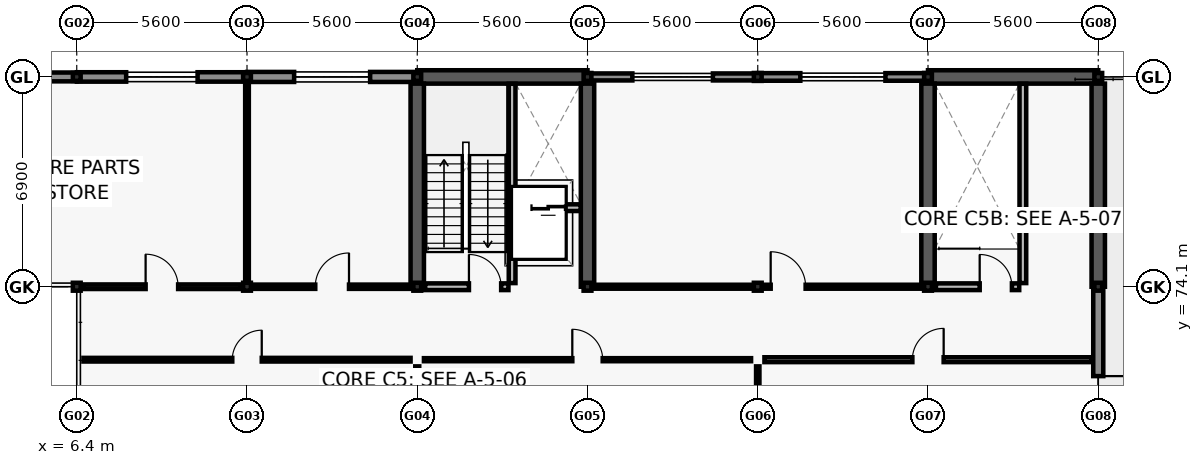
"""IFC4 building model, lengths in metres.
Left out: names, types, materials, properties, quantities, classifications, styles, units other than length and angle.
Written with IfcOpenShell. Run it as: python <this file> out.ifc"""

import sys

from ifc_helpers import new_model, si_unit, direction, frame, frame_2d, origin, origin_2d, place, context, subcontext, project, spatial, rectangle, i_section, extrude, element, fill, save


model = new_model("IFC4")
c1 = context("Model", 3, precision=1e-05, world=origin(), true_north=direction((0.0, 1.0)))
c2 = subcontext(c1, "Body", "Model", "MODEL_VIEW")
j1 = project(units=[si_unit("LENGTHUNIT", "METRE"), si_unit("PLANEANGLEUNIT", "RADIAN")], contexts=[c1])
p1 = place(None, origin())
s1 = spatial("IfcSite", under=j1, at=p1, CompositionType="ELEMENT")
p2 = place(p1, origin())
s2 = spatial("IfcBuilding", under=s1, at=p2, CompositionType="ELEMENT")
p3 = place(p2, frame((0.0, 0.0, 5.4)))
s3 = spatial("IfcBuildingStorey", under=s2, at=p3, CompositionType="ELEMENT", Elevation=5.4)
for number, where, z_axis, x_axis in (
    (1, (6.4, 74.1, 0.0), (0.0, 0.0, 1.0), (1.0, 0.0, 0.0)),
    (2, (6.4, 81.0, 0.0), (0.0, 0.0, 1.0), (1.0, 0.0, 0.0)),
    (3, (12.0, 74.1, 0.0), (0.0, 0.0, 1.0), (1.0, 0.0, 0.0)),
    (4, (12.0, 81.0, 0.0), (0.0, 0.0, 1.0), (1.0, 0.0, 0.0)),
    (5, (17.6, 74.1, 0.0), (0.0, 0.0, 1.0), (1.0, 0.0, 0.0)),
    (6, (17.6, 81.0, 0.0), (0.0, 0.0, 1.0), (1.0, 0.0, 0.0)),
    (7, (23.2, 74.1, 0.0), (0.0, 0.0, 1.0), (1.0, 0.0, 0.0)),
    (8, (23.2, 81.0, 0.0), (0.0, 0.0, 1.0), (1.0, 0.0, 0.0)),
    (9, (28.8, 74.1, 0.0), (0.0, 0.0, 1.0), (1.0, 0.0, 0.0)),
    (10, (28.8, 81.0, 0.0), (0.0, 0.0, 1.0), (1.0, 0.0, 0.0)),
    (11, (34.4, 74.1, 0.0), (0.0, 0.0, 1.0), (1.0, 0.0, 0.0)),
    (12, (34.4, 81.0, 0.0), (0.0, 0.0, 1.0), (1.0, 0.0, 0.0)),
    (13, (40.0, 74.1, 0.0), (0.0, 0.0, 1.0), (1.0, 0.0, 0.0)),
    (14, (40.0, 81.0, 0.0), (0.0, 0.0, 1.0), (1.0, 0.0, 0.0)),
):
    element("IfcColumn", number, at=place(p3, frame(where, z_axis=z_axis, x_axis=x_axis)), inside=s3, PredefinedType="COLUMN", context=c2, shape_type="SweptSolid", body=[
        extrude(i_section(OverallWidth=0.256, OverallDepth=0.26, WebThickness=0.01, FlangeThickness=0.017, FilletRadius=0.013, at=origin_2d()), origin(), (0.0, 0.0, 1.0), 4.2),
    ])
p4 = place(p3, frame((17.6, 81.0, 0.0), z_axis=(0.0, 0.0, 1.0), x_axis=(1.0, 0.0, 0.0)))
e15 = element("IfcWall", 15, at=p4, inside=s3, PredefinedType="SHEAR", context=c2, shape_type="SweptSolid", body=[
    extrude(rectangle(XDim=5.6, YDim=0.44, at=frame_2d((2.8, 0.0))), origin(), (0.0, 0.0, 1.0), 3.96),
])
for number, where, z_axis, x_axis in (
    (16, (17.6, 74.1, 0.0), (0.0, 0.0, 1.0), (0.0, 1.0, 0.0)),
    (17, (23.2, 74.1, 0.0), (0.0, 0.0, 1.0), (0.0, 1.0, 0.0)),
):
    element("IfcWall", number, at=place(p3, frame(where, z_axis=z_axis, x_axis=x_axis)), inside=s3, PredefinedType="SHEAR", context=c2, shape_type="SweptSolid", body=[
        extrude(rectangle(XDim=6.68, YDim=0.44, at=frame_2d((3.34, 0.0))), origin(), (0.0, 0.0, 1.0), 3.96),
    ])
p5 = place(p3, frame((34.4, 81.0, 0.0), z_axis=(0.0, 0.0, 1.0), x_axis=(1.0, 0.0, 0.0)))
e18 = element("IfcWall", 18, at=p5, inside=s3, PredefinedType="SHEAR", context=c2, shape_type="SweptSolid", body=[
    extrude(rectangle(XDim=5.6, YDim=0.44, at=frame_2d((2.8, 0.0))), origin(), (0.0, 0.0, 1.0), 3.96),
])
for number, where, z_axis, x_axis in (
    (19, (34.4, 74.1, 0.0), (0.0, 0.0, 1.0), (0.0, 1.0, 0.0)),
    (20, (40.0, 74.1, 0.0), (0.0, 0.0, 1.0), (0.0, 1.0, 0.0)),
):
    element("IfcWall", number, at=place(p3, frame(where, z_axis=z_axis, x_axis=x_axis)), inside=s3, PredefinedType="SHEAR", context=c2, shape_type="SweptSolid", body=[
        extrude(rectangle(XDim=6.68, YDim=0.44, at=frame_2d((3.34, 0.0))), origin(), (0.0, 0.0, 1.0), 3.96),
    ])
p6 = place(p3, frame((0.805, 81.0, 0.0), z_axis=(0.0, 0.0, 1.0), x_axis=(1.0, 0.0, 0.0)))
e21 = element("IfcWall", 21, at=p6, inside=s3, PredefinedType="SOLIDWALL", context=c2, shape_type="SweptSolid", body=[
    extrude(rectangle(XDim=5.59, YDim=0.29, at=frame_2d((2.795, 0.0))), origin(), (0.0, 0.0, 1.0), 3.32),
])
p7 = place(p6, frame((1.695, 0.0, 0.8)))
e22 = element("IfcOpeningElement", 22, at=p7, cuts=e21, PredefinedType="OPENING", context=c2, shape_type="SweptSolid", body=[
    extrude(rectangle(XDim=2.2, YDim=1.8, at=frame_2d((1.1, 0.9))), frame((0.0, 0.155, 0.0), z_axis=(0.0, -1.0, 0.0), x_axis=(1.0, 0.0, 0.0)), (0.0, 0.0, 1.0), 0.31),
])
p8 = place(p3, frame((6.405, 81.0, 0.0), z_axis=(0.0, 0.0, 1.0), x_axis=(1.0, 0.0, 0.0)))
e23 = element("IfcWall", 23, at=p8, inside=s3, PredefinedType="SOLIDWALL", context=c2, shape_type="SweptSolid", body=[
    extrude(rectangle(XDim=5.59, YDim=0.31, at=frame_2d((2.795, 0.0))), origin(), (0.0, 0.0, 1.0), 3.32),
])
p9 = place(p8, frame((1.62, 0.0, 0.8)))
e24 = element("IfcOpeningElement", 24, at=p9, cuts=e23, PredefinedType="OPENING", context=c2, shape_type="SweptSolid", body=[
    extrude(rectangle(XDim=2.35, YDim=1.8, at=frame_2d((1.175, 0.9))), frame((0.0, 0.165, 0.0), z_axis=(0.0, -1.0, 0.0), x_axis=(1.0, 0.0, 0.0)), (0.0, 0.0, 1.0), 0.33),
])
p10 = place(p3, frame((12.005, 81.0, 0.0), z_axis=(0.0, 0.0, 1.0), x_axis=(1.0, 0.0, 0.0)))
e25 = element("IfcWall", 25, at=p10, inside=s3, PredefinedType="SOLIDWALL", context=c2, shape_type="SweptSolid", body=[
    extrude(rectangle(XDim=5.59, YDim=0.33, at=frame_2d((2.795, 0.0))), origin(), (0.0, 0.0, 1.0), 3.32),
])
p11 = place(p10, frame((1.545, 0.0, 0.8)))
e26 = element("IfcOpeningElement", 26, at=p11, cuts=e25, PredefinedType="OPENING", context=c2, shape_type="SweptSolid", body=[
    extrude(rectangle(XDim=2.5, YDim=1.8, at=frame_2d((1.25, 0.9))), frame((0.0, 0.175, 0.0), z_axis=(0.0, -1.0, 0.0), x_axis=(1.0, 0.0, 0.0)), (0.0, 0.0, 1.0), 0.35),
])
p12 = place(p3, frame((23.205, 81.0, 0.0), z_axis=(0.0, 0.0, 1.0), x_axis=(1.0, 0.0, 0.0)))
e27 = element("IfcWall", 27, at=p12, inside=s3, PredefinedType="SOLIDWALL", context=c2, shape_type="SweptSolid", body=[
    extrude(rectangle(XDim=5.59, YDim=0.23, at=frame_2d((2.795, 0.0))), origin(), (0.0, 0.0, 1.0), 3.32),
])
p13 = place(p12, frame((1.47, 0.0, 0.8)))
e28 = element("IfcOpeningElement", 28, at=p13, cuts=e27, PredefinedType="OPENING", context=c2, shape_type="SweptSolid", body=[
    extrude(rectangle(XDim=2.65, YDim=1.8, at=frame_2d((1.325, 0.9))), frame((0.0, 0.125, 0.0), z_axis=(0.0, -1.0, 0.0), x_axis=(1.0, 0.0, 0.0)), (0.0, 0.0, 1.0), 0.25),
])
p14 = place(p3, frame((28.805, 81.0, 0.0), z_axis=(0.0, 0.0, 1.0), x_axis=(1.0, 0.0, 0.0)))
e29 = element("IfcWall", 29, at=p14, inside=s3, PredefinedType="SOLIDWALL", context=c2, shape_type="SweptSolid", body=[
    extrude(rectangle(XDim=5.59, YDim=0.25, at=frame_2d((2.795, 0.0))), origin(), (0.0, 0.0, 1.0), 3.32),
])
p15 = place(p14, frame((1.395, 0.0, 0.8)))
e30 = element("IfcOpeningElement", 30, at=p15, cuts=e29, PredefinedType="OPENING", context=c2, shape_type="SweptSolid", body=[
    extrude(rectangle(XDim=2.8, YDim=1.8, at=frame_2d((1.4, 0.9))), frame((0.0, 0.135, 0.0), z_axis=(0.0, -1.0, 0.0), x_axis=(1.0, 0.0, 0.0)), (0.0, 0.0, 1.0), 0.27),
])
p16 = place(p3, frame((40.0, 74.095, 0.0), z_axis=(0.0, 0.0, 1.0), x_axis=(0.0, -1.0, 0.0)))
e31 = element("IfcWall", 31, at=p16, inside=s3, PredefinedType="SOLIDWALL", context=c2, shape_type="SweptSolid", body=[
    extrude(rectangle(XDim=6.89, YDim=0.33, at=frame_2d((3.445, 0.0))), origin(), (0.0, 0.0, 1.0), 3.32),
])
p17 = place(p16, frame((2.935, 0.0, 0.0)))
e32 = element("IfcOpeningElement", 32, at=p17, cuts=e31, PredefinedType="OPENING", context=c2, shape_type="SweptSolid", body=[
    extrude(rectangle(XDim=1.02, YDim=2.14, at=frame_2d((0.51, 1.07))), frame((0.0, 0.175, 0.0), z_axis=(0.0, -1.0, 0.0), x_axis=(1.0, 0.0, 0.0)), (0.0, 0.0, 1.0), 0.35),
])
p18 = place(p3, frame((20.72, 74.22, 0.0), z_axis=(0.0, 0.0, 1.0), x_axis=(0.0, 1.0, 0.0)))
e33 = element("IfcWall", 33, at=p18, inside=s3, PredefinedType="SOLIDWALL", context=c2, shape_type="SweptSolid", body=[
    extrude(rectangle(XDim=6.555, YDim=0.22, at=frame_2d((3.277, 0.0))), origin(), (0.0, 0.0, 1.0), 3.96),
])
p19 = place(p3, frame((17.86, 74.1, 0.0), z_axis=(0.0, 0.0, 1.0), x_axis=(1.0, 0.0, 0.0)))
e34 = element("IfcWall", 34, at=p19, inside=s3, PredefinedType="SOLIDWALL", context=c2, shape_type="SweptSolid", body=[
    extrude(rectangle(XDim=2.74, YDim=0.22, at=frame_2d((1.37, 0.0))), origin(), (0.0, 0.0, 1.0), 3.32),
])
p20 = place(p19, frame((1.44, 0.0, 0.0)))
e35 = element("IfcOpeningElement", 35, at=p20, cuts=e34, PredefinedType="OPENING", context=c2, shape_type="SweptSolid", body=[
    extrude(rectangle(XDim=1.06, YDim=2.1, at=frame_2d((0.53, 1.05))), frame((0.0, 0.12, 0.0), z_axis=(0.0, -1.0, 0.0), x_axis=(1.0, 0.0, 0.0)), (0.0, 0.0, 1.0), 0.24),
])
p21 = place(p3, frame((20.84, 76.7, 0.0), z_axis=(0.0, 0.0, 1.0), x_axis=(1.0, 0.0, 0.0)))
e36 = element("IfcWall", 36, at=p21, inside=s3, PredefinedType="SOLIDWALL", context=c2, shape_type="SweptSolid", body=[
    extrude(rectangle(XDim=2.135, YDim=0.22, at=frame_2d((1.067, 0.0))), origin(), (0.0, 0.0, 1.0), 3.96),
])
p22 = place(p21, frame((0.518, 0.0, 0.0)))
e37 = element("IfcOpeningElement", 37, at=p22, cuts=e36, PredefinedType="OPENING", context=c2, shape_type="SweptSolid", body=[
    extrude(rectangle(XDim=1.1, YDim=2.1, at=frame_2d((0.55, 1.05))), frame((0.0, 0.12, 0.0), z_axis=(0.0, -1.0, 0.0), x_axis=(1.0, 0.0, 0.0)), (0.0, 0.0, 1.0), 0.24),
])
p23 = place(p3, frame((37.52, 74.22, 0.0), z_axis=(0.0, 0.0, 1.0), x_axis=(0.0, 1.0, 0.0)))
e38 = element("IfcWall", 38, at=p23, inside=s3, PredefinedType="SOLIDWALL", context=c2, shape_type="SweptSolid", body=[
    extrude(rectangle(XDim=6.555, YDim=0.22, at=frame_2d((3.277, 0.0))), origin(), (0.0, 0.0, 1.0), 3.96),
])
p24 = place(p3, frame((34.66, 74.1, 0.0), z_axis=(0.0, 0.0, 1.0), x_axis=(1.0, 0.0, 0.0)))
e39 = element("IfcWall", 39, at=p24, inside=s3, PredefinedType="SOLIDWALL", context=c2, shape_type="SweptSolid", body=[
    extrude(rectangle(XDim=2.74, YDim=0.22, at=frame_2d((1.37, 0.0))), origin(), (0.0, 0.0, 1.0), 3.32),
])
p25 = place(p24, frame((1.44, 0.0, 0.0)))
e40 = element("IfcOpeningElement", 40, at=p25, cuts=e39, PredefinedType="OPENING", context=c2, shape_type="SweptSolid", body=[
    extrude(rectangle(XDim=1.06, YDim=2.1, at=frame_2d((0.53, 1.05))), frame((0.0, 0.12, 0.0), z_axis=(0.0, -1.0, 0.0), x_axis=(1.0, 0.0, 0.0)), (0.0, 0.0, 1.0), 0.24),
])
p26 = place(p3, frame((17.6, 60.52, 0.0), z_axis=(0.0, 0.0, 1.0), x_axis=(0.0, 1.0, 0.0)))
e41 = element("IfcWall", 41, at=p26, inside=s3, PredefinedType="PARTITIONING", context=c2, shape_type="SweptSolid", body=[
    extrude(rectangle(XDim=10.96, YDim=0.13, at=frame_2d((5.48, 0.0))), origin(), (0.0, 0.0, 1.0), 3.3),
])
p27 = place(p3, frame((6.62, 71.7, 0.0), z_axis=(0.0, 0.0, 1.0), x_axis=(1.0, 0.0, 0.0)))
e42 = element("IfcWall", 42, at=p27, inside=s3, PredefinedType="PARTITIONING", context=c2, shape_type="SweptSolid", body=[
    extrude(rectangle(XDim=10.76, YDim=0.12, at=frame_2d((5.38, 0.0))), origin(), (0.0, 0.0, 1.0), 3.3),
])
p28 = place(p27, frame((4.895, 0.0, 0.0)))
e43 = element("IfcOpeningElement", 43, at=p28, cuts=e42, PredefinedType="OPENING", context=c2, shape_type="SweptSolid", body=[
    extrude(rectangle(XDim=0.97, YDim=2.1, at=frame_2d((0.485, 1.05))), frame((0.0, 0.07, 0.0), z_axis=(0.0, -1.0, 0.0), x_axis=(1.0, 0.0, 0.0)), (0.0, 0.0, 1.0), 0.14),
])
p29 = place(p3, frame((28.8, 60.52, 0.0), z_axis=(0.0, 0.0, 1.0), x_axis=(0.0, 1.0, 0.0)))
e44 = element("IfcWall", 44, at=p29, inside=s3, PredefinedType="PARTITIONING", context=c2, shape_type="SweptSolid", body=[
    extrude(rectangle(XDim=10.96, YDim=0.11, at=frame_2d((5.48, 0.0))), origin(), (0.0, 0.0, 1.0), 3.3),
])
p30 = place(p3, frame((17.82, 71.7, 0.0), z_axis=(0.0, 0.0, 1.0), x_axis=(1.0, 0.0, 0.0)))
e45 = element("IfcWall", 45, at=p30, inside=s3, PredefinedType="PARTITIONING", context=c2, shape_type="SweptSolid", body=[
    extrude(rectangle(XDim=10.76, YDim=0.1, at=frame_2d((5.38, 0.0))), origin(), (0.0, 0.0, 1.0), 3.3),
])
p31 = place(p30, frame((4.88, 0.0, 0.0)))
e46 = element("IfcOpeningElement", 46, at=p31, cuts=e45, PredefinedType="OPENING", context=c2, shape_type="SweptSolid", body=[
    extrude(rectangle(XDim=1.0, YDim=2.12, at=frame_2d((0.5, 1.06))), frame((0.0, 0.06, 0.0), z_axis=(0.0, -1.0, 0.0), x_axis=(1.0, 0.0, 0.0)), (0.0, 0.0, 1.0), 0.12),
])
p32 = place(p3, frame((29.02, 71.7, 0.0), z_axis=(0.0, 0.0, 1.0), x_axis=(1.0, 0.0, 0.0)))
e47 = element("IfcWall", 47, at=p32, inside=s3, PredefinedType="PARTITIONING", context=c2, shape_type="SweptSolid", body=[
    extrude(rectangle(XDim=10.76, YDim=0.16, at=frame_2d((5.38, 0.0))), origin(), (0.0, 0.0, 1.0), 3.3),
])
p33 = place(p32, frame((4.865, 0.0, 0.0)))
e48 = element("IfcOpeningElement", 48, at=p33, cuts=e47, PredefinedType="OPENING", context=c2, shape_type="SweptSolid", body=[
    extrude(rectangle(XDim=1.03, YDim=2.06, at=frame_2d((0.515, 1.03))), frame((0.0, 0.09, 0.0), z_axis=(0.0, -1.0, 0.0), x_axis=(1.0, 0.0, 0.0)), (0.0, 0.0, 1.0), 0.18),
])
p34 = place(p3, frame((6.62, 74.1, 0.0), z_axis=(0.0, 0.0, 1.0), x_axis=(1.0, 0.0, 0.0)))
e49 = element("IfcWall", 49, at=p34, inside=s3, PredefinedType="PARTITIONING", context=c2, shape_type="SweptSolid", body=[
    extrude(rectangle(XDim=5.16, YDim=0.15, at=frame_2d((2.58, 0.0))), origin(), (0.0, 0.0, 1.0), 3.3),
])
p35 = place(p34, frame((2.045, 0.0, 0.0)))
e50 = element("IfcOpeningElement", 50, at=p35, cuts=e49, PredefinedType="OPENING", context=c2, shape_type="SweptSolid", body=[
    extrude(rectangle(XDim=1.07, YDim=2.08, at=frame_2d((0.535, 1.04))), frame((0.0, 0.085, 0.0), z_axis=(0.0, -1.0, 0.0), x_axis=(1.0, 0.0, 0.0)), (0.0, 0.0, 1.0), 0.17),
])
p36 = place(p3, frame((12.22, 74.1, 0.0), z_axis=(0.0, 0.0, 1.0), x_axis=(1.0, 0.0, 0.0)))
e51 = element("IfcWall", 51, at=p36, inside=s3, PredefinedType="PARTITIONING", context=c2, shape_type="SweptSolid", body=[
    extrude(rectangle(XDim=5.16, YDim=0.14, at=frame_2d((2.58, 0.0))), origin(), (0.0, 0.0, 1.0), 3.3),
])
p37 = place(p36, frame((2.025, 0.0, 0.0)))
e52 = element("IfcOpeningElement", 52, at=p37, cuts=e51, PredefinedType="OPENING", context=c2, shape_type="SweptSolid", body=[
    extrude(rectangle(XDim=1.11, YDim=2.1, at=frame_2d((0.555, 1.05))), frame((0.0, 0.08, 0.0), z_axis=(0.0, -1.0, 0.0), x_axis=(1.0, 0.0, 0.0)), (0.0, 0.0, 1.0), 0.16),
])
p38 = place(p3, frame((23.42, 74.1, 0.0), z_axis=(0.0, 0.0, 1.0), x_axis=(1.0, 0.0, 0.0)))
e53 = element("IfcWall", 53, at=p38, inside=s3, PredefinedType="PARTITIONING", context=c2, shape_type="SweptSolid", body=[
    extrude(rectangle(XDim=10.76, YDim=0.13, at=frame_2d((5.38, 0.0))), origin(), (0.0, 0.0, 1.0), 3.3),
])
p39 = place(p38, frame((5.805, 0.0, 0.0)))
e54 = element("IfcOpeningElement", 54, at=p39, cuts=e53, PredefinedType="OPENING", context=c2, shape_type="SweptSolid", body=[
    extrude(rectangle(XDim=1.15, YDim=2.12, at=frame_2d((0.575, 1.06))), frame((0.0, 0.075, 0.0), z_axis=(0.0, -1.0, 0.0), x_axis=(1.0, 0.0, 0.0)), (0.0, 0.0, 1.0), 0.15),
])
p40 = place(p3, frame((12.0, 74.32, 0.0), z_axis=(0.0, 0.0, 1.0), x_axis=(0.0, 1.0, 0.0)))
e55 = element("IfcWall", 55, at=p40, inside=s3, PredefinedType="PARTITIONING", context=c2, shape_type="SweptSolid", body=[
    extrude(rectangle(XDim=6.46, YDim=0.12, at=frame_2d((3.23, 0.0))), origin(), (0.0, 0.0, 1.0), 3.3),
])
p41 = place(p9, origin())
e56 = element("IfcWindow", 56, at=p41, inside=s3, PartitioningType="DOUBLE_PANEL_VERTICAL", PredefinedType="WINDOW", context=c2, shape_type="SweptSolid", body=[
    extrude(rectangle(XDim=2.35, YDim=1.8, at=frame_2d((1.175, 0.9))), frame((0.0, 0.03, 0.0), z_axis=(0.0, -1.0, 0.0), x_axis=(1.0, 0.0, 0.0)), (0.0, 0.0, 1.0), 0.06),
])
fill(e24, e56)
p42 = place(p11, origin())
e57 = element("IfcWindow", 57, at=p42, inside=s3, PartitioningType="TRIPLE_PANEL_VERTICAL", PredefinedType="WINDOW", context=c2, shape_type="SweptSolid", body=[
    extrude(rectangle(XDim=2.5, YDim=1.8, at=frame_2d((1.25, 0.9))), frame((0.0, 0.03, 0.0), z_axis=(0.0, -1.0, 0.0), x_axis=(1.0, 0.0, 0.0)), (0.0, 0.0, 1.0), 0.06),
])
fill(e26, e57)
p43 = place(p13, origin())
e58 = element("IfcWindow", 58, at=p43, inside=s3, PartitioningType="TRIPLE_PANEL_VERTICAL", PredefinedType="WINDOW", context=c2, shape_type="SweptSolid", body=[
    extrude(rectangle(XDim=2.65, YDim=1.8, at=frame_2d((1.325, 0.9))), frame((0.0, 0.03, 0.0), z_axis=(0.0, -1.0, 0.0), x_axis=(1.0, 0.0, 0.0)), (0.0, 0.0, 1.0), 0.06),
])
fill(e28, e58)
p44 = place(p15, origin())
e59 = element("IfcWindow", 59, at=p44, inside=s3, PartitioningType="TRIPLE_PANEL_VERTICAL", PredefinedType="WINDOW", context=c2, shape_type="SweptSolid", body=[
    extrude(rectangle(XDim=2.8, YDim=1.8, at=frame_2d((1.4, 0.9))), frame((0.0, 0.03, 0.0), z_axis=(0.0, -1.0, 0.0), x_axis=(1.0, 0.0, 0.0)), (0.0, 0.0, 1.0), 0.06),
])
fill(e30, e59)
p45 = place(p17, origin())
e60 = element("IfcDoor", 60, at=p45, inside=s3, OperationType="SINGLE_SWING_LEFT", PredefinedType="DOOR", context=c2, shape_type="SweptSolid", body=[
    extrude(rectangle(XDim=1.02, YDim=2.14, at=frame_2d((0.51, 1.07))), frame((0.0, 0.025, 0.0), z_axis=(0.0, -1.0, 0.0), x_axis=(1.0, 0.0, 0.0)), (0.0, 0.0, 1.0), 0.05),
])
fill(e32, e60)
p46 = place(p20, origin())
e61 = element("IfcDoor", 61, at=p46, inside=s3, OperationType="SINGLE_SWING_LEFT", PredefinedType="DOOR", context=c2, shape_type="SweptSolid", body=[
    extrude(rectangle(XDim=1.06, YDim=2.1, at=frame_2d((0.53, 1.05))), frame((0.0, 0.025, 0.0), z_axis=(0.0, -1.0, 0.0), x_axis=(1.0, 0.0, 0.0)), (0.0, 0.0, 1.0), 0.05),
])
fill(e35, e61)
p47 = place(p22, origin())
e62 = element("IfcDoor", 62, at=p47, inside=s3, OperationType="DOUBLE_DOOR_SLIDING", PredefinedType="DOOR", context=c2, shape_type="SweptSolid", body=[
    extrude(rectangle(XDim=1.1, YDim=2.1, at=frame_2d((0.55, 1.05))), frame((0.0, 0.025, 0.0), z_axis=(0.0, -1.0, 0.0), x_axis=(1.0, 0.0, 0.0)), (0.0, 0.0, 1.0), 0.05),
])
fill(e37, e62)
p48 = place(p25, origin())
e63 = element("IfcDoor", 63, at=p48, inside=s3, OperationType="SINGLE_SWING_LEFT", PredefinedType="DOOR", context=c2, shape_type="SweptSolid", body=[
    extrude(rectangle(XDim=1.06, YDim=2.1, at=frame_2d((0.53, 1.05))), frame((0.0, 0.025, 0.0), z_axis=(0.0, -1.0, 0.0), x_axis=(1.0, 0.0, 0.0)), (0.0, 0.0, 1.0), 0.05),
])
fill(e40, e63)
p49 = place(p28, origin())
e64 = element("IfcDoor", 64, at=p49, inside=s3, OperationType="SINGLE_SWING_RIGHT", PredefinedType="DOOR", context=c2, shape_type="SweptSolid", body=[
    extrude(rectangle(XDim=0.97, YDim=2.1, at=frame_2d((0.485, 1.05))), frame((0.0, 0.025, 0.0), z_axis=(0.0, -1.0, 0.0), x_axis=(1.0, 0.0, 0.0)), (0.0, 0.0, 1.0), 0.05),
])
fill(e43, e64)
p50 = place(p31, origin())
e65 = element("IfcDoor", 65, at=p50, inside=s3, OperationType="SINGLE_SWING_LEFT", PredefinedType="DOOR", context=c2, shape_type="SweptSolid", body=[
    extrude(rectangle(XDim=1.0, YDim=2.12, at=frame_2d((0.5, 1.06))), frame((0.0, 0.025, 0.0), z_axis=(0.0, -1.0, 0.0), x_axis=(1.0, 0.0, 0.0)), (0.0, 0.0, 1.0), 0.05),
])
fill(e46, e65)
p51 = place(p33, origin())
e66 = element("IfcDoor", 66, at=p51, inside=s3, OperationType="SINGLE_SWING_RIGHT", PredefinedType="DOOR", context=c2, shape_type="SweptSolid", body=[
    extrude(rectangle(XDim=1.03, YDim=2.06, at=frame_2d((0.515, 1.03))), frame((0.0, 0.025, 0.0), z_axis=(0.0, -1.0, 0.0), x_axis=(1.0, 0.0, 0.0)), (0.0, 0.0, 1.0), 0.05),
])
fill(e48, e66)
p52 = place(p35, origin())
e67 = element("IfcDoor", 67, at=p52, inside=s3, OperationType="SINGLE_SWING_LEFT", PredefinedType="DOOR", context=c2, shape_type="SweptSolid", body=[
    extrude(rectangle(XDim=1.07, YDim=2.08, at=frame_2d((0.535, 1.04))), frame((0.0, 0.025, 0.0), z_axis=(0.0, -1.0, 0.0), x_axis=(1.0, 0.0, 0.0)), (0.0, 0.0, 1.0), 0.05),
])
fill(e50, e67)
p53 = place(p37, origin())
e68 = element("IfcDoor", 68, at=p53, inside=s3, OperationType="SINGLE_SWING_RIGHT", PredefinedType="DOOR", context=c2, shape_type="SweptSolid", body=[
    extrude(rectangle(XDim=1.11, YDim=2.1, at=frame_2d((0.555, 1.05))), frame((0.0, 0.025, 0.0), z_axis=(0.0, -1.0, 0.0), x_axis=(1.0, 0.0, 0.0)), (0.0, 0.0, 1.0), 0.05),
])
fill(e52, e68)
p54 = place(p39, origin())
e69 = element("IfcDoor", 69, at=p54, inside=s3, OperationType="SINGLE_SWING_LEFT", PredefinedType="DOOR", context=c2, shape_type="SweptSolid", body=[
    extrude(rectangle(XDim=1.15, YDim=2.12, at=frame_2d((0.575, 1.06))), frame((0.0, 0.025, 0.0), z_axis=(0.0, -1.0, 0.0), x_axis=(1.0, 0.0, 0.0)), (0.0, 0.0, 1.0), 0.05),
])
fill(e54, e69)
save(model, sys.argv[1])
